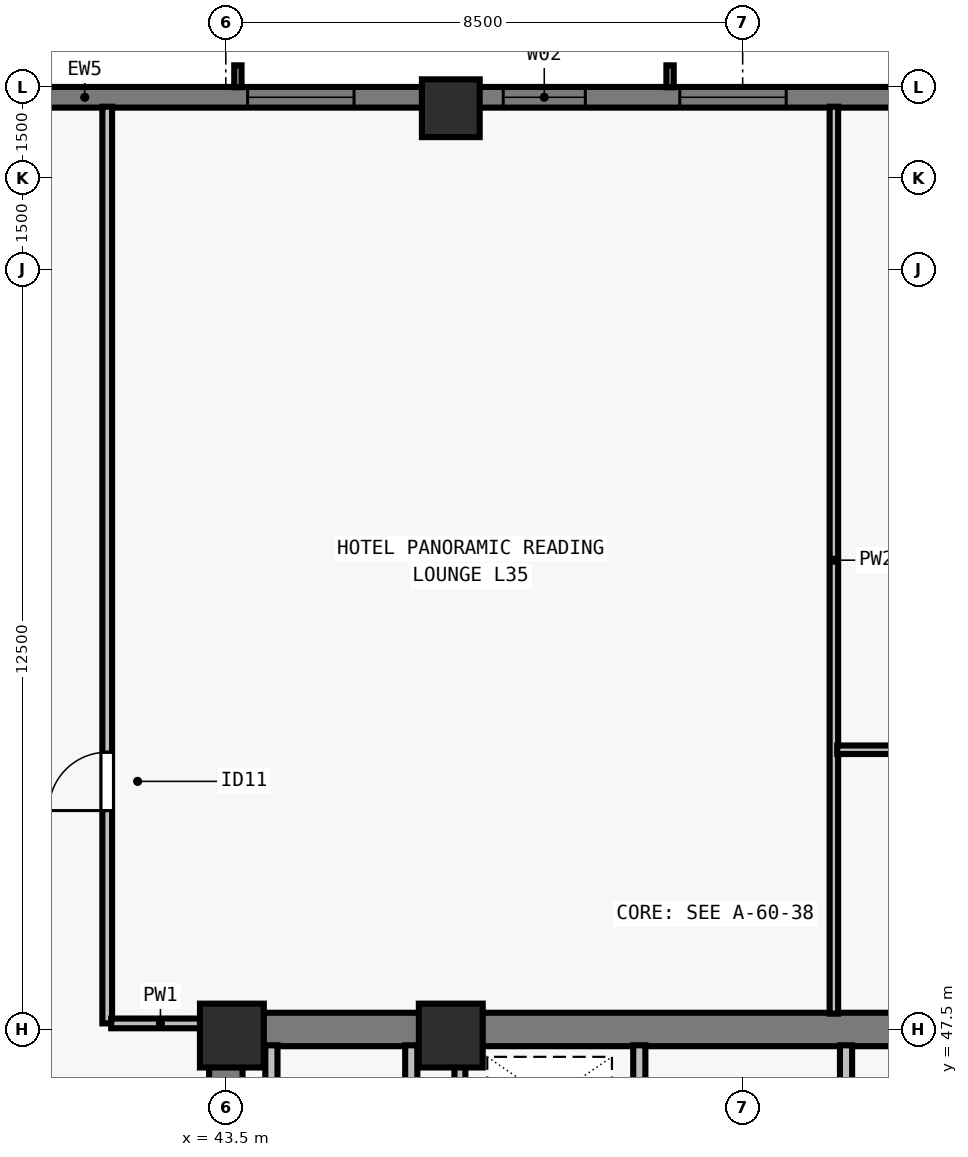
"""IFC4 building model, lengths in metres.
Left out: names, types, materials, properties, quantities, classifications, styles, units other than length and angle.
Written with IfcOpenShell. Run it as: python <this file> out.ifc"""

import sys

from ifc_helpers import new_model, si_unit, direction, frame, frame_2d, origin, origin_2d, place, context, subcontext, project, spatial, rectangle, extrude, element, fill, save


model = new_model("IFC4")
c1 = context("Model", 3, precision=1e-05, world=origin(), true_north=direction((0.0, 1.0)))
c2 = subcontext(c1, "Body", "Model", "MODEL_VIEW")
j1 = project(units=[si_unit("LENGTHUNIT", "METRE"), si_unit("PLANEANGLEUNIT", "RADIAN")], contexts=[c1])
p1 = place(None, origin())
s1 = spatial("IfcSite", under=j1, at=p1, CompositionType="ELEMENT")
p2 = place(p1, origin())
s2 = spatial("IfcBuilding", under=s1, at=p2, CompositionType="ELEMENT")
p3 = place(p2, frame((0.0, 0.0, 130.5)))
s3 = spatial("IfcBuildingStorey", under=s2, at=p3, CompositionType="ELEMENT", Elevation=130.5)
for number, where, z_axis, x_axis in (
    (1, (43.6, 47.4, 0.0), (0.0, 0.0, 1.0), (1.0, 0.0, 0.0)),
    (2, (47.2, 47.4, 0.0), (0.0, 0.0, 1.0), (1.0, 0.0, 0.0)),
):
    element("IfcColumn", number, at=place(p3, frame(where, z_axis=z_axis, x_axis=x_axis)), inside=s3, PredefinedType="COLUMN", context=c2, shape_type="SweptSolid", body=[
        extrude(rectangle(XDim=1.05, YDim=1.05, at=origin_2d()), origin(), (0.0, 0.0, 1.0), 3.5),
    ])
p4 = place(p3, frame((47.2, 62.65, 0.0), z_axis=(0.0, 0.0, 1.0), x_axis=(1.0, 0.0, 0.0)))
e3 = element("IfcColumn", 3, at=p4, inside=s3, PredefinedType="COLUMN", context=c2, shape_type="SweptSolid", body=[
    extrude(rectangle(XDim=0.95, YDim=0.95, at=origin_2d()), origin(), (0.0, 0.0, 1.0), 3.5),
])
p5 = place(p3, frame((32.0, 62.83, 0.0), z_axis=(0.0, 0.0, 1.0), x_axis=(1.0, 0.0, 0.0)))
e4 = element("IfcWall", 4, at=p5, inside=s3, PredefinedType="SOLIDWALL", context=c2, shape_type="SweptSolid", body=[
    extrude(rectangle(XDim=39.682, YDim=0.34, at=frame_2d((19.841, 0.0))), origin(), (0.0, 0.0, 1.0), 3.28),
])
p6 = place(p5, frame((4.752, 0.0, 0.8)))
e5 = element("IfcOpeningElement", 5, at=p6, cuts=e4, PredefinedType="OPENING", context=c2, shape_type="SweptSolid", body=[
    extrude(rectangle(XDim=1.75, YDim=1.66, at=frame_2d((0.875, 0.83))), frame((0.0, 0.18, 0.0), z_axis=(0.0, -1.0, 0.0), x_axis=(1.0, 0.0, 0.0)), (0.0, 0.0, 1.0), 0.36),
])
p7 = place(p5, frame((11.859, 0.0, 0.8)))
e6 = element("IfcOpeningElement", 6, at=p7, cuts=e4, PredefinedType="OPENING", context=c2, shape_type="SweptSolid", body=[
    extrude(rectangle(XDim=1.75, YDim=1.66, at=frame_2d((0.875, 0.83))), frame((0.0, 0.18, 0.0), z_axis=(0.0, -1.0, 0.0), x_axis=(1.0, 0.0, 0.0)), (0.0, 0.0, 1.0), 0.36),
])
p8 = place(p5, frame((16.062, 0.0, 0.8)))
e7 = element("IfcOpeningElement", 7, at=p8, cuts=e4, PredefinedType="OPENING", context=c2, shape_type="SweptSolid", body=[
    extrude(rectangle(XDim=1.35, YDim=1.66, at=frame_2d((0.675, 0.83))), frame((0.0, 0.18, 0.0), z_axis=(0.0, -1.0, 0.0), x_axis=(1.0, 0.0, 0.0)), (0.0, 0.0, 1.0), 0.36),
])
p9 = place(p5, frame((18.966, 0.0, 0.8)))
e8 = element("IfcOpeningElement", 8, at=p9, cuts=e4, PredefinedType="OPENING", context=c2, shape_type="SweptSolid", body=[
    extrude(rectangle(XDim=1.75, YDim=1.66, at=frame_2d((0.875, 0.83))), frame((0.0, 0.18, 0.0), z_axis=(0.0, -1.0, 0.0), x_axis=(1.0, 0.0, 0.0)), (0.0, 0.0, 1.0), 0.36),
])
p10 = place(p5, frame((22.719, 0.0, 0.8)))
e9 = element("IfcOpeningElement", 9, at=p10, cuts=e4, PredefinedType="OPENING", context=c2, shape_type="SweptSolid", body=[
    extrude(rectangle(XDim=1.35, YDim=1.66, at=frame_2d((0.675, 0.83))), frame((0.0, 0.18, 0.0), z_axis=(0.0, -1.0, 0.0), x_axis=(1.0, 0.0, 0.0)), (0.0, 0.0, 1.0), 0.36),
])
p11 = place(p5, frame((26.073, 0.0, 0.8)))
e10 = element("IfcOpeningElement", 10, at=p11, cuts=e4, PredefinedType="OPENING", context=c2, shape_type="SweptSolid", body=[
    extrude(rectangle(XDim=1.75, YDim=1.66, at=frame_2d((0.875, 0.83))), frame((0.0, 0.18, 0.0), z_axis=(0.0, -1.0, 0.0), x_axis=(1.0, 0.0, 0.0)), (0.0, 0.0, 1.0), 0.36),
])
p12 = place(p5, frame((29.827, 0.0, 0.8)))
e11 = element("IfcOpeningElement", 11, at=p12, cuts=e4, PredefinedType="OPENING", context=c2, shape_type="SweptSolid", body=[
    extrude(rectangle(XDim=1.35, YDim=1.66, at=frame_2d((0.675, 0.83))), frame((0.0, 0.18, 0.0), z_axis=(0.0, -1.0, 0.0), x_axis=(1.0, 0.0, 0.0)), (0.0, 0.0, 1.0), 0.36),
])
p13 = place(p5, frame((34.23, 0.0, 0.8)))
e12 = element("IfcOpeningElement", 12, at=p13, cuts=e4, PredefinedType="OPENING", context=c2, shape_type="SweptSolid", body=[
    extrude(rectangle(XDim=0.9, YDim=1.66, at=frame_2d((0.45, 0.83))), frame((0.0, 0.18, 0.0), z_axis=(0.0, -1.0, 0.0), x_axis=(1.0, 0.0, 0.0)), (0.0, 0.0, 1.0), 0.36),
])
p14 = place(p3, frame((43.225, 47.5, 0.0), z_axis=(0.0, 0.0, 1.0), x_axis=(1.0, 0.0, 0.0)))
e13 = element("IfcWall", 13, at=p14, inside=s3, PredefinedType="SHEAR", context=c2, shape_type="SweptSolid", body=[
    extrude(rectangle(XDim=17.55, YDim=0.55, at=frame_2d((8.775, 0.0))), origin(), (0.0, 0.0, 1.0), 3.28),
])
p15 = place(p3, frame((43.5, 40.8, 0.0), z_axis=(0.0, 0.0, 1.0), x_axis=(0.0, 1.0, 0.0)))
e14 = element("IfcWall", 14, at=p15, inside=s3, PredefinedType="SHEAR", context=c2, shape_type="SweptSolid", body=[
    extrude(rectangle(XDim=6.435, YDim=0.55, at=frame_2d((3.218, 0.0))), origin(), (0.0, 0.0, 1.0), 3.28),
])
p16 = place(p3, frame((50.3, 40.585, 0.0), z_axis=(0.0, 0.0, 1.0), x_axis=(0.0, 1.0, 0.0)))
e15 = element("IfcWall", 15, at=p16, inside=s3, PredefinedType="SOLIDWALL", context=c2, shape_type="SweptSolid", body=[
    extrude(rectangle(XDim=6.655, YDim=0.2, at=frame_2d((3.328, 0.0))), origin(), (0.0, 0.0, 1.0), 3.28),
])
p17 = place(p16, frame((5.065, 0.0, 0.0)))
e16 = element("IfcOpeningElement", 16, at=p17, cuts=e15, PredefinedType="OPENING", context=c2, shape_type="SweptSolid", body=[
    extrude(rectangle(XDim=0.8, YDim=2.08, at=frame_2d((0.4, 1.04))), frame((0.0, 0.11, 0.0), z_axis=(0.0, -1.0, 0.0), x_axis=(1.0, 0.0, 0.0)), (0.0, 0.0, 1.0), 0.22),
])
p18 = place(p3, frame((53.7, 40.585, 0.0), z_axis=(0.0, 0.0, 1.0), x_axis=(0.0, 1.0, 0.0)))
e17 = element("IfcWall", 17, at=p18, inside=s3, PredefinedType="SOLIDWALL", context=c2, shape_type="SweptSolid", body=[
    extrude(rectangle(XDim=6.655, YDim=0.2, at=frame_2d((3.328, 0.0))), origin(), (0.0, 0.0, 1.0), 3.28),
])
p19 = place(p18, frame((0.195, 0.0, 0.0)))
e18 = element("IfcOpeningElement", 18, at=p19, cuts=e17, PredefinedType="OPENING", context=c2, shape_type="SweptSolid", body=[
    extrude(rectangle(XDim=0.8, YDim=2.08, at=frame_2d((0.4, 1.04))), frame((0.0, 0.11, 0.0), z_axis=(0.0, -1.0, 0.0), x_axis=(1.0, 0.0, 0.0)), (0.0, 0.0, 1.0), 0.22),
])
p20 = place(p18, frame((4.265, 0.0, 0.0)))
e19 = element("IfcOpeningElement", 19, at=p20, cuts=e17, PredefinedType="OPENING", context=c2, shape_type="SweptSolid", body=[
    extrude(rectangle(XDim=0.95, YDim=2.12, at=frame_2d((0.475, 1.06))), frame((0.0, 0.11, 0.0), z_axis=(0.0, -1.0, 0.0), x_axis=(1.0, 0.0, 0.0)), (0.0, 0.0, 1.0), 0.22),
])
for number, where, z_axis, x_axis in (
    (20, (46.55, 43.735, 0.0), (0.0, 0.0, 1.0), (0.0, 1.0, 0.0)),
    (21, (44.25, 43.735, 0.0), (0.0, 0.0, 1.0), (0.0, 1.0, 0.0)),
):
    element("IfcWall", number, at=place(p3, frame(where, z_axis=z_axis, x_axis=x_axis)), inside=s3, PredefinedType="SOLIDWALL", context=c2, shape_type="SweptSolid", body=[
        extrude(rectangle(XDim=3.505, YDim=0.2, at=frame_2d((1.752, 0.0))), origin(), (0.0, 0.0, 1.0), 3.28),
    ])
p21 = place(p3, frame((47.35, 43.735, 0.0), z_axis=(0.0, 0.0, 1.0), x_axis=(0.0, 1.0, 0.0)))
e22 = element("IfcWall", 22, at=p21, inside=s3, PredefinedType="SOLIDWALL", context=c2, shape_type="SweptSolid", body=[
    extrude(rectangle(XDim=3.505, YDim=0.18, at=frame_2d((1.752, 0.0))), origin(), (0.0, 0.0, 1.0), 3.28),
])
p22 = place(p3, frame((41.55, 47.6, 0.0), z_axis=(0.0, 0.0, 1.0), x_axis=(0.0, 1.0, 0.0)))
e23 = element("IfcWall", 23, at=p22, inside=s3, PredefinedType="PARTITIONING", context=c2, shape_type="SweptSolid", body=[
    extrude(rectangle(XDim=15.075, YDim=0.16, at=frame_2d((7.538, 0.0))), origin(), (0.0, 0.0, 1.0), 2.555),
])
p23 = place(p22, frame((3.5, 0.0, 0.0)))
e24 = element("IfcOpeningElement", 24, at=p23, cuts=e23, PredefinedType="OPENING", context=c2, shape_type="SweptSolid", body=[
    extrude(rectangle(XDim=0.96, YDim=2.12, at=frame_2d((0.48, 1.06))), frame((0.0, 0.09, 0.0), z_axis=(0.0, -1.0, 0.0), x_axis=(1.0, 0.0, 0.0)), (0.0, 0.0, 1.0), 0.18),
])
p24 = place(p3, frame((41.615, 47.6, 0.0), z_axis=(0.0, 0.0, 1.0), x_axis=(1.0, 0.0, 0.0)))
e25 = element("IfcWall", 25, at=p24, inside=s3, PredefinedType="PARTITIONING", context=c2, shape_type="SweptSolid", body=[
    extrude(rectangle(XDim=1.62, YDim=0.16, at=frame_2d((0.81, 0.0))), origin(), (0.0, 0.0, 1.0), 3.28),
])
p25 = place(p3, frame((53.5, 47.76, 0.0), z_axis=(0.0, 0.0, 1.0), x_axis=(0.0, 1.0, 0.0)))
e26 = element("IfcWall", 26, at=p25, inside=s3, PredefinedType="PARTITIONING", context=c2, shape_type="SweptSolid", body=[
    extrude(rectangle(XDim=14.915, YDim=0.14, at=frame_2d((7.458, 0.0))), origin(), (0.0, 0.0, 1.0), 2.896),
])
p26 = place(p3, frame((53.555, 52.1, 0.0), z_axis=(0.0, 0.0, 1.0), x_axis=(1.0, 0.0, 0.0)))
e27 = element("IfcWall", 27, at=p26, inside=s3, PredefinedType="PARTITIONING", context=c2, shape_type="SweptSolid", body=[
    extrude(rectangle(XDim=10.13, YDim=0.14, at=frame_2d((5.065, 0.0))), origin(), (0.0, 0.0, 1.0), 3.28),
])
p27 = place(p7, origin())
e28 = element("IfcWindow", 28, at=p27, inside=s3, PartitioningType="SINGLE_PANEL", PredefinedType="WINDOW", context=c2, shape_type="SweptSolid", body=[
    extrude(rectangle(XDim=1.75, YDim=1.66, at=frame_2d((0.875, 0.83))), frame((0.0, -0.05, 0.0), z_axis=(0.0, -1.0, 0.0), x_axis=(1.0, 0.0, 0.0)), (0.0, 0.0, 1.0), 0.06),
])
fill(e6, e28)
p28 = place(p8, origin())
e29 = element("IfcWindow", 29, at=p28, inside=s3, PartitioningType="SINGLE_PANEL", PredefinedType="WINDOW", context=c2, shape_type="SweptSolid", body=[
    extrude(rectangle(XDim=1.35, YDim=1.66, at=frame_2d((0.675, 0.83))), frame((0.0, -0.05, 0.0), z_axis=(0.0, -1.0, 0.0), x_axis=(1.0, 0.0, 0.0)), (0.0, 0.0, 1.0), 0.06),
])
fill(e7, e29)
p29 = place(p9, origin())
e30 = element("IfcWindow", 30, at=p29, inside=s3, PartitioningType="SINGLE_PANEL", PredefinedType="WINDOW", context=c2, shape_type="SweptSolid", body=[
    extrude(rectangle(XDim=1.75, YDim=1.66, at=frame_2d((0.875, 0.83))), frame((0.0, -0.05, 0.0), z_axis=(0.0, -1.0, 0.0), x_axis=(1.0, 0.0, 0.0)), (0.0, 0.0, 1.0), 0.06),
])
fill(e8, e30)
p30 = place(p23, origin())
e31 = element("IfcDoor", 31, at=p30, inside=s3, OperationType="SINGLE_SWING_LEFT", PredefinedType="DOOR", context=c2, shape_type="SweptSolid", body=[
    extrude(rectangle(XDim=0.96, YDim=2.12, at=frame_2d((0.48, 1.06))), frame((0.0, 0.025, 0.0), z_axis=(0.0, -1.0, 0.0), x_axis=(1.0, 0.0, 0.0)), (0.0, 0.0, 1.0), 0.05),
])
fill(e24, e31)
save(model, sys.argv[1])
